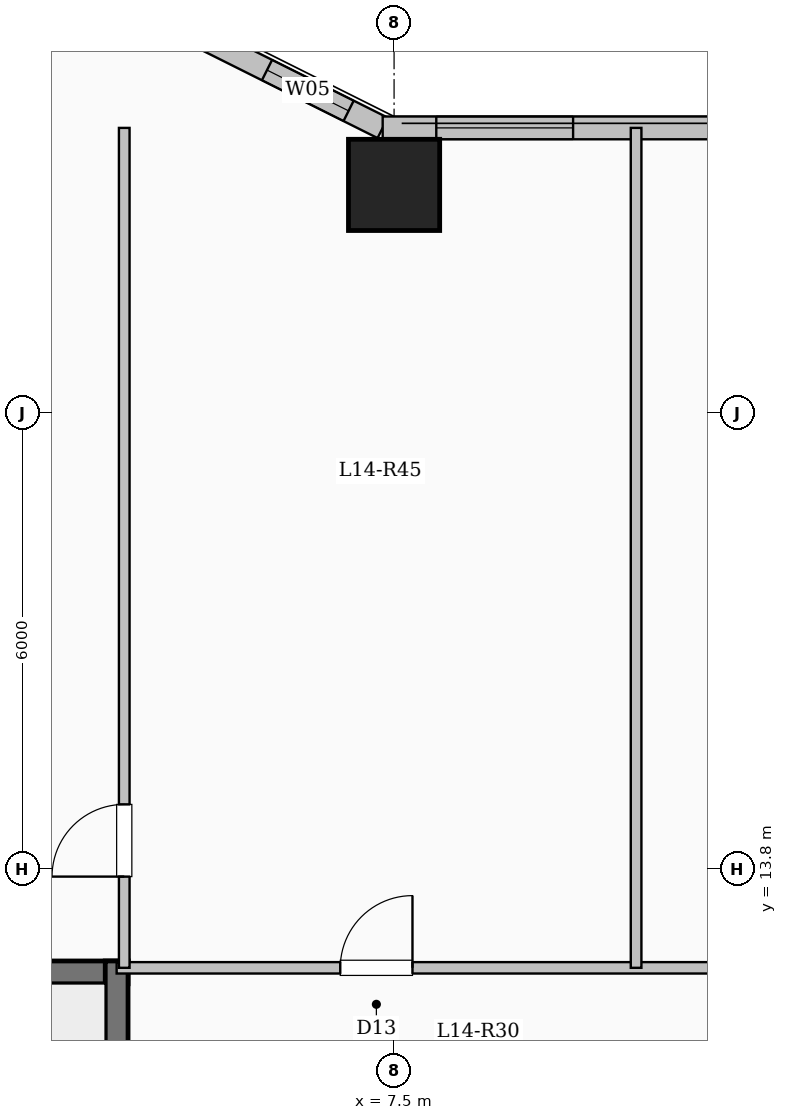
"""IFC4 building model, lengths in metres.
Left out: names, types, materials, properties, quantities, classifications, styles, units other than length and angle.
Written with IfcOpenShell. Run it as: python <this file> out.ifc"""

import sys

from ifc_helpers import new_model, si_unit, direction, frame, frame_2d, origin, origin_2d, place, context, subcontext, project, spatial, rectangle, extrude, element, fill, save


model = new_model("IFC4")
c1 = context("Model", 3, precision=1e-05, world=origin(), true_north=direction((0.0, 1.0)))
c2 = subcontext(c1, "Body", "Model", "MODEL_VIEW")
j1 = project(units=[si_unit("LENGTHUNIT", "METRE"), si_unit("PLANEANGLEUNIT", "RADIAN")], contexts=[c1])
p1 = place(None, origin())
s1 = spatial("IfcSite", under=j1, at=p1, CompositionType="ELEMENT")
p2 = place(p1, origin())
s2 = spatial("IfcBuilding", under=s1, at=p2, CompositionType="ELEMENT")
p3 = place(p2, frame((0.0, 0.0, 54.15)))
s3 = spatial("IfcBuildingStorey", under=s2, at=p3, CompositionType="ELEMENT", Elevation=54.15)
p4 = place(p3, frame((7.5, 22.8, 0.0), z_axis=(0.0, 0.0, 1.0), x_axis=(1.0, 0.0, 0.0)))
e1 = element("IfcColumn", 1, at=p4, inside=s3, PredefinedType="COLUMN", context=c2, shape_type="SweptSolid", body=[
    extrude(rectangle(XDim=1.2, YDim=1.2, at=origin_2d()), origin(), (0.0, 0.0, 1.0), 3.35),
])
p5 = place(p3, frame((4.35, 25.05, 0.0), z_axis=(0.0, 0.0, 1.0), x_axis=(0.894427191, -0.4472135955, 0.0)))
e2 = element("IfcWall", 2, at=p5, inside=s3, PredefinedType="SOLIDWALL", context=c2, shape_type="SweptSolid", body=[
    extrude(rectangle(XDim=3.354, YDim=0.3, at=frame_2d((1.677, 0.0))), origin(), (0.0, 0.0, 1.0), 3.1),
])
p6 = place(p5, frame((1.653, 0.0, 0.95)))
e3 = element("IfcOpeningElement", 3, at=p6, cuts=e2, PredefinedType="OPENING", context=c2, shape_type="SweptSolid", body=[
    extrude(rectangle(XDim=1.2, YDim=1.5, at=frame_2d((0.6, 0.75))), frame((0.0, 0.16, 0.0), z_axis=(0.0, -1.0, 0.0), x_axis=(1.0, 0.0, 0.0)), (0.0, 0.0, 1.0), 0.32),
])
p7 = place(p3, frame((7.35, 23.55, 0.0), z_axis=(0.0, 0.0, 1.0), x_axis=(1.0, 0.0, 0.0)))
e4 = element("IfcWall", 4, at=p7, inside=s3, PredefinedType="SOLIDWALL", context=c2, shape_type="SweptSolid", body=[
    extrude(rectangle(XDim=15.3, YDim=0.3, at=frame_2d((7.65, 0.0))), origin(), (0.0, 0.0, 1.0), 3.1),
])
p8 = place(p7, frame((0.705, 0.0, 0.9)))
e5 = element("IfcOpeningElement", 5, at=p8, cuts=e4, PredefinedType="OPENING", context=c2, shape_type="SweptSolid", body=[
    extrude(rectangle(XDim=1.8, YDim=1.65, at=frame_2d((0.9, 0.825))), frame((0.0, 0.16, 0.0), z_axis=(0.0, -1.0, 0.0), x_axis=(1.0, 0.0, 0.0)), (0.0, 0.0, 1.0), 0.32),
])
p9 = place(p7, frame((5.772, 0.0, 0.9)))
e6 = element("IfcOpeningElement", 6, at=p9, cuts=e4, PredefinedType="OPENING", context=c2, shape_type="SweptSolid", body=[
    extrude(rectangle(XDim=1.8, YDim=1.65, at=frame_2d((0.9, 0.825))), frame((0.0, 0.16, 0.0), z_axis=(0.0, -1.0, 0.0), x_axis=(1.0, 0.0, 0.0)), (0.0, 0.0, 1.0), 0.32),
])
p10 = place(p3, frame((-4.0, 12.44, 0.0), z_axis=(0.0, 0.0, 1.0), x_axis=(1.0, 0.0, 0.0)))
e7 = element("IfcWall", 7, at=p10, inside=s3, PredefinedType="SHEAR", context=c2, shape_type="SweptSolid", body=[
    extrude(rectangle(XDim=8.0, YDim=0.3, at=frame_2d((4.0, 0.0))), origin(), (0.0, 0.0, 1.0), 3.35),
])
p11 = place(p3, frame((3.85, 9.0, 0.0), z_axis=(0.0, 0.0, 1.0), x_axis=(0.0, 1.0, 0.0)))
e8 = element("IfcWall", 8, at=p11, inside=s3, PredefinedType="SHEAR", context=c2, shape_type="SweptSolid", body=[
    extrude(rectangle(XDim=3.59, YDim=0.3, at=frame_2d((1.795, 0.0))), origin(), (0.0, 0.0, 1.0), 3.35),
])
p12 = place(p3, frame((3.85, 12.5, 0.0), z_axis=(0.0, 0.0, 1.0), x_axis=(1.0, 0.0, 0.0)))
e9 = element("IfcWall", 9, at=p12, inside=s3, PredefinedType="PARTITIONING", context=c2, shape_type="SweptSolid", body=[
    extrude(rectangle(XDim=18.7, YDim=0.15, at=frame_2d((9.35, 0.0))), origin(), (0.0, 0.0, 1.0), 3.1),
])
p13 = place(p12, frame((2.942, 0.0, 0.0)))
e10 = element("IfcOpeningElement", 10, at=p13, cuts=e9, PredefinedType="OPENING", context=c2, shape_type="SweptSolid", body=[
    extrude(rectangle(XDim=0.95, YDim=2.15, at=frame_2d((0.475, 1.075))), frame((0.0, 0.085, 0.0), z_axis=(0.0, -1.0, 0.0), x_axis=(1.0, 0.0, 0.0)), (0.0, 0.0, 1.0), 0.17),
])
p14 = place(p12, frame((9.647, 0.0, 0.0)))
e11 = element("IfcOpeningElement", 11, at=p14, cuts=e9, PredefinedType="OPENING", context=c2, shape_type="SweptSolid", body=[
    extrude(rectangle(XDim=0.95, YDim=2.15, at=frame_2d((0.475, 1.075))), frame((0.0, 0.085, 0.0), z_axis=(0.0, -1.0, 0.0), x_axis=(1.0, 0.0, 0.0)), (0.0, 0.0, 1.0), 0.17),
])
p15 = place(p12, frame((15.61, 0.0, 0.0)))
e12 = element("IfcOpeningElement", 12, at=p15, cuts=e9, PredefinedType="OPENING", context=c2, shape_type="SweptSolid", body=[
    extrude(rectangle(XDim=0.95, YDim=2.15, at=frame_2d((0.475, 1.075))), frame((0.0, 0.085, 0.0), z_axis=(0.0, -1.0, 0.0), x_axis=(1.0, 0.0, 0.0)), (0.0, 0.0, 1.0), 0.17),
])
p16 = place(p3, frame((3.95, 12.5, 0.0), z_axis=(0.0, 0.0, 1.0), x_axis=(0.0, 1.0, 0.0)))
e13 = element("IfcWall", 13, at=p16, inside=s3, PredefinedType="PARTITIONING", context=c2, shape_type="SweptSolid", body=[
    extrude(rectangle(XDim=11.05, YDim=0.14, at=frame_2d((5.525, 0.0))), origin(), (0.0, 0.0, 1.0), 3.1),
])
p17 = place(p16, frame((1.2, 0.0, 0.0)))
e14 = element("IfcOpeningElement", 14, at=p17, cuts=e13, PredefinedType="OPENING", context=c2, shape_type="SweptSolid", body=[
    extrude(rectangle(XDim=0.95, YDim=2.15, at=frame_2d((0.475, 1.075))), frame((0.0, 0.08, 0.0), z_axis=(0.0, -1.0, 0.0), x_axis=(1.0, 0.0, 0.0)), (0.0, 0.0, 1.0), 0.16),
])
p18 = place(p3, frame((10.684, 12.5, 0.0), z_axis=(0.0, 0.0, 1.0), x_axis=(0.0, 1.0, 0.0)))
e15 = element("IfcWall", 15, at=p18, inside=s3, PredefinedType="PARTITIONING", context=c2, shape_type="SweptSolid", body=[
    extrude(rectangle(XDim=11.05, YDim=0.14, at=frame_2d((5.525, 0.0))), origin(), (0.0, 0.0, 1.0), 3.1),
])
p19 = place(p6, origin())
e16 = element("IfcWindow", 16, at=p19, inside=s3, PartitioningType="SINGLE_PANEL", PredefinedType="WINDOW", context=c2, shape_type="SweptSolid", body=[
    extrude(rectangle(XDim=1.2, YDim=1.5, at=frame_2d((0.6, 0.75))), frame((0.0, 0.03, 0.0), z_axis=(0.0, -1.0, 0.0), x_axis=(1.0, 0.0, 0.0)), (0.0, 0.0, 1.0), 0.06),
])
fill(e3, e16)
p20 = place(p8, origin())
e17 = element("IfcWindow", 17, at=p20, inside=s3, PartitioningType="SINGLE_PANEL", PredefinedType="WINDOW", context=c2, shape_type="SweptSolid", body=[
    extrude(rectangle(XDim=1.8, YDim=1.65, at=frame_2d((0.9, 0.825))), frame((0.0, 0.03, 0.0), z_axis=(0.0, -1.0, 0.0), x_axis=(1.0, 0.0, 0.0)), (0.0, 0.0, 1.0), 0.06),
])
fill(e5, e17)
p21 = place(p13, origin())
e18 = element("IfcDoor", 18, at=p21, inside=s3, OperationType="SINGLE_SWING_RIGHT", PredefinedType="DOOR", context=c2, shape_type="SweptSolid", body=[
    extrude(rectangle(XDim=0.95, YDim=2.15, at=frame_2d((0.475, 1.075))), frame((0.0, 0.025, 0.0), z_axis=(0.0, -1.0, 0.0), x_axis=(1.0, 0.0, 0.0)), (0.0, 0.0, 1.0), 0.05),
])
fill(e10, e18)
p22 = place(p17, origin())
e19 = element("IfcDoor", 19, at=p22, inside=s3, OperationType="SINGLE_SWING_LEFT", PredefinedType="DOOR", context=c2, shape_type="SweptSolid", body=[
    extrude(rectangle(XDim=0.95, YDim=2.15, at=frame_2d((0.475, 1.075))), frame((0.0, 0.025, 0.0), z_axis=(0.0, -1.0, 0.0), x_axis=(1.0, 0.0, 0.0)), (0.0, 0.0, 1.0), 0.05),
])
fill(e14, e19)
save(model, sys.argv[1])
